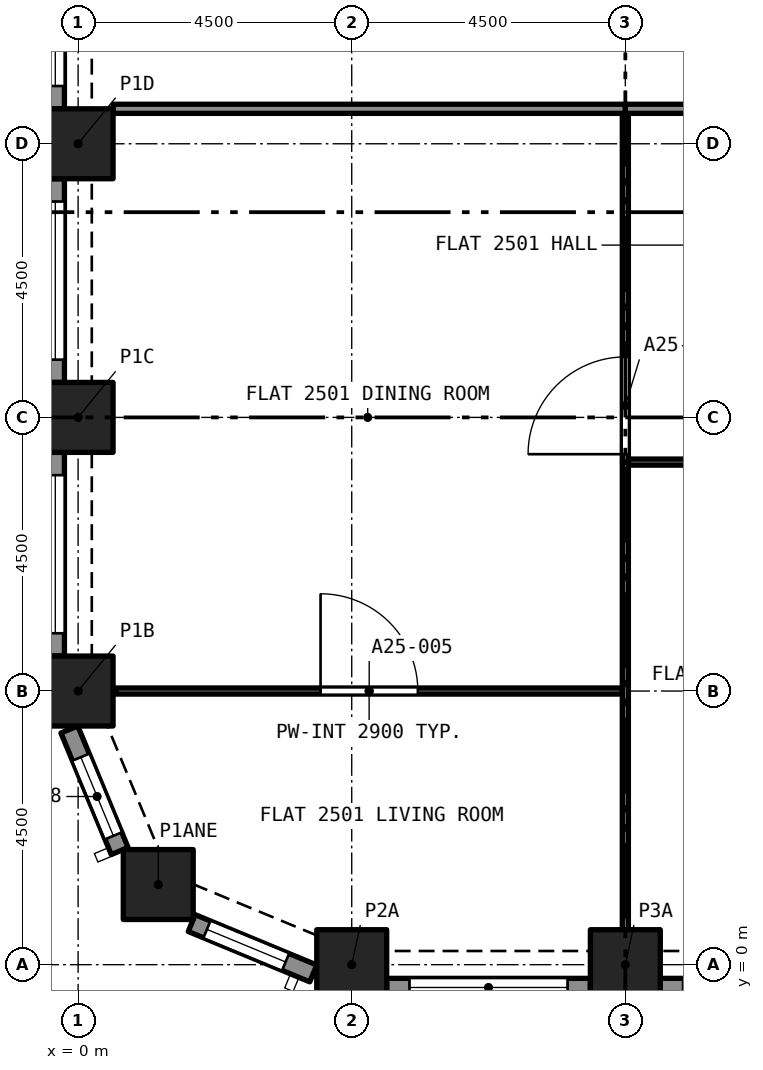
"""IFC4 building model, lengths in metres.
Left out: names, types, materials, properties, quantities, classifications, styles, units other than length and angle.
Written with IfcOpenShell. Run it as: python <this file> out.ifc"""

import sys

from ifc_helpers import new_model, si_unit, direction, frame, frame_2d, origin, origin_2d, place, context, subcontext, project, spatial, rectangle, extrude, element, fill, save


model = new_model("IFC4")
c1 = context("Model", 3, precision=1e-05, world=origin(), true_north=direction((0.0, 1.0)))
c2 = subcontext(c1, "Body", "Model", "MODEL_VIEW")
j1 = project(units=[si_unit("LENGTHUNIT", "METRE"), si_unit("PLANEANGLEUNIT", "RADIAN")], contexts=[c1])
p1 = place(None, origin())
s1 = spatial("IfcSite", under=j1, at=p1, CompositionType="ELEMENT")
p2 = place(p1, origin())
s2 = spatial("IfcBuilding", under=s1, at=p2, CompositionType="ELEMENT")
p3 = place(p2, frame((0.0, 0.0, 92.8)))
s3 = spatial("IfcBuildingStorey", under=s2, at=p3, CompositionType="ELEMENT", Elevation=92.8)
for number, where, z_axis, x_axis in (
    (1, (4.5, 0.0, 0.0), (0.0, 0.0, 1.0), (1.0, 0.0, 0.0)),
    (2, (9.0, 0.0, 0.0), (0.0, 0.0, 1.0), (1.0, 0.0, 0.0)),
    (3, (1.318, 1.318, 0.0), (0.0, 0.0, 1.0), (1.0, 0.0, 0.0)),
    (4, (0.0, 4.5, 0.0), (0.0, 0.0, 1.0), (1.0, 0.0, 0.0)),
    (5, (0.0, 9.0, 0.0), (0.0, 0.0, 1.0), (1.0, 0.0, 0.0)),
    (6, (0.0, 13.5, 0.0), (0.0, 0.0, 1.0), (1.0, 0.0, 0.0)),
):
    element("IfcColumn", number, at=place(p3, frame(where, z_axis=z_axis, x_axis=x_axis)), inside=s3, PredefinedType="COLUMN", context=c2, shape_type="SweptSolid", body=[
        extrude(rectangle(XDim=1.15, YDim=1.15, at=origin_2d()), origin(), (0.0, 0.0, 1.0), 3.2),
    ])
p4 = place(p3, frame((0.684, 1.869, 0.0), z_axis=(0.0, 0.0, 1.0), x_axis=(-0.382723818695, 0.923862802911, 0.0)))
e7 = element("IfcWall", 7, at=p4, inside=s3, PredefinedType="SOLIDWALL", context=c2, shape_type="SweptSolid", body=[
    extrude(rectangle(XDim=2.164, YDim=0.3, at=frame_2d((1.082, 0.0))), origin(), (0.0, 0.0, 1.0), 3.2),
])
p5 = place(p4, frame((0.271, 0.0, 0.45)))
e8 = element("IfcOpeningElement", 8, at=p5, cuts=e7, PredefinedType="OPENING", context=c2, shape_type="SweptSolid", body=[
    extrude(rectangle(XDim=1.4, YDim=1.95, at=frame_2d((0.7, 0.975))), frame((0.0, 0.16, 0.0), z_axis=(0.0, -1.0, 0.0), x_axis=(1.0, 0.0, 0.0)), (0.0, 0.0, 1.0), 0.32),
])
p6 = place(p3, frame((3.868, -0.144, 0.0), z_axis=(0.0, 0.0, 1.0), x_axis=(-0.923862802911, 0.382723818695, 0.0)))
e9 = element("IfcWall", 9, at=p6, inside=s3, PredefinedType="SOLIDWALL", context=c2, shape_type="SweptSolid", body=[
    extrude(rectangle(XDim=2.164, YDim=0.3, at=frame_2d((1.082, 0.0))), origin(), (0.0, 0.0, 1.0), 3.2),
])
p7 = place(p6, frame((0.493, 0.0, 0.45)))
e10 = element("IfcOpeningElement", 10, at=p7, cuts=e9, PredefinedType="OPENING", context=c2, shape_type="SweptSolid", body=[
    extrude(rectangle(XDim=1.4, YDim=1.95, at=frame_2d((0.7, 0.975))), frame((0.0, 0.16, 0.0), z_axis=(0.0, -1.0, 0.0), x_axis=(1.0, 0.0, 0.0)), (0.0, 0.0, 1.0), 0.32),
])
p8 = place(p3, frame((8.425, -0.375, 0.0), z_axis=(0.0, 0.0, 1.0), x_axis=(-1.0, 0.0, 0.0)))
e11 = element("IfcWall", 11, at=p8, inside=s3, PredefinedType="SOLIDWALL", context=c2, shape_type="SweptSolid", body=[
    extrude(rectangle(XDim=3.35, YDim=0.3, at=frame_2d((1.675, 0.0))), origin(), (0.0, 0.0, 1.0), 3.2),
])
p9 = place(p8, frame((0.375, 0.0, 0.45)))
e12 = element("IfcOpeningElement", 12, at=p9, cuts=e11, PredefinedType="OPENING", context=c2, shape_type="SweptSolid", body=[
    extrude(rectangle(XDim=2.6, YDim=1.95, at=frame_2d((1.3, 0.975))), frame((0.0, 0.16, 0.0), z_axis=(0.0, -1.0, 0.0), x_axis=(1.0, 0.0, 0.0)), (0.0, 0.0, 1.0), 0.32),
])
p10 = place(p3, frame((12.925, -0.375, 0.0), z_axis=(0.0, 0.0, 1.0), x_axis=(-1.0, 0.0, 0.0)))
e13 = element("IfcWall", 13, at=p10, inside=s3, PredefinedType="SOLIDWALL", context=c2, shape_type="SweptSolid", body=[
    extrude(rectangle(XDim=3.35, YDim=0.3, at=frame_2d((1.675, 0.0))), origin(), (0.0, 0.0, 1.0), 3.2),
])
p11 = place(p10, frame((0.375, 0.0, 0.45)))
e14 = element("IfcOpeningElement", 14, at=p11, cuts=e13, PredefinedType="OPENING", context=c2, shape_type="SweptSolid", body=[
    extrude(rectangle(XDim=2.6, YDim=1.95, at=frame_2d((1.3, 0.975))), frame((0.0, 0.16, 0.0), z_axis=(0.0, -1.0, 0.0), x_axis=(1.0, 0.0, 0.0)), (0.0, 0.0, 1.0), 0.32),
])
p12 = place(p3, frame((-0.375, 14.075, 0.0), z_axis=(0.0, 0.0, 1.0), x_axis=(0.0, 1.0, 0.0)))
e15 = element("IfcWall", 15, at=p12, inside=s3, PredefinedType="SOLIDWALL", context=c2, shape_type="SweptSolid", body=[
    extrude(rectangle(XDim=3.35, YDim=0.3, at=frame_2d((1.675, 0.0))), origin(), (0.0, 0.0, 1.0), 3.2),
])
p13 = place(p12, frame((0.375, 0.0, 0.45)))
e16 = element("IfcOpeningElement", 16, at=p13, cuts=e15, PredefinedType="OPENING", context=c2, shape_type="SweptSolid", body=[
    extrude(rectangle(XDim=2.6, YDim=1.95, at=frame_2d((1.3, 0.975))), frame((0.0, 0.16, 0.0), z_axis=(0.0, -1.0, 0.0), x_axis=(1.0, 0.0, 0.0)), (0.0, 0.0, 1.0), 0.32),
])
p14 = place(p3, frame((-0.375, 9.575, 0.0), z_axis=(0.0, 0.0, 1.0), x_axis=(0.0, 1.0, 0.0)))
e17 = element("IfcWall", 17, at=p14, inside=s3, PredefinedType="SOLIDWALL", context=c2, shape_type="SweptSolid", body=[
    extrude(rectangle(XDim=3.35, YDim=0.3, at=frame_2d((1.675, 0.0))), origin(), (0.0, 0.0, 1.0), 3.2),
])
p15 = place(p14, frame((0.375, 0.0, 0.45)))
e18 = element("IfcOpeningElement", 18, at=p15, cuts=e17, PredefinedType="OPENING", context=c2, shape_type="SweptSolid", body=[
    extrude(rectangle(XDim=2.6, YDim=1.95, at=frame_2d((1.3, 0.975))), frame((0.0, 0.16, 0.0), z_axis=(0.0, -1.0, 0.0), x_axis=(1.0, 0.0, 0.0)), (0.0, 0.0, 1.0), 0.32),
])
p16 = place(p3, frame((-0.375, 5.075, 0.0), z_axis=(0.0, 0.0, 1.0), x_axis=(0.0, 1.0, 0.0)))
e19 = element("IfcWall", 19, at=p16, inside=s3, PredefinedType="SOLIDWALL", context=c2, shape_type="SweptSolid", body=[
    extrude(rectangle(XDim=3.35, YDim=0.3, at=frame_2d((1.675, 0.0))), origin(), (0.0, 0.0, 1.0), 3.2),
])
p17 = place(p16, frame((0.375, 0.0, 0.45)))
e20 = element("IfcOpeningElement", 20, at=p17, cuts=e19, PredefinedType="OPENING", context=c2, shape_type="SweptSolid", body=[
    extrude(rectangle(XDim=2.6, YDim=1.95, at=frame_2d((1.3, 0.975))), frame((0.0, 0.16, 0.0), z_axis=(0.0, -1.0, 0.0), x_axis=(1.0, 0.0, 0.0)), (0.0, 0.0, 1.0), 0.32),
])
p18 = place(p3, frame((13.5, 8.265, 0.0), z_axis=(0.0, 0.0, 1.0), x_axis=(-1.0, 0.0, 0.0)))
e21 = element("IfcWall", 21, at=p18, inside=s3, PredefinedType="PARTITIONING", context=c2, shape_type="SweptSolid", body=[
    extrude(rectangle(XDim=4.45, YDim=0.1, at=frame_2d((2.225, 0.0))), origin(), (0.0, 0.0, 1.0), 2.9),
])
p19 = place(p18, frame((1.8, 0.0, 0.0)))
e22 = element("IfcOpeningElement", 22, at=p19, cuts=e21, PredefinedType="OPENING", context=c2, shape_type="SweptSolid", body=[
    extrude(rectangle(XDim=0.9, YDim=2.1, at=frame_2d((0.45, 1.05))), frame((0.0, 0.06, 0.0), z_axis=(0.0, -1.0, 0.0), x_axis=(1.0, 0.0, 0.0)), (0.0, 0.0, 1.0), 0.12),
])
p20 = place(p3, frame((9.0, 0.575, 0.0), z_axis=(0.0, 0.0, 1.0), x_axis=(0.0, 1.0, 0.0)))
e23 = element("IfcWall", 23, at=p20, inside=s3, PredefinedType="PARTITIONING", context=c2, shape_type="SweptSolid", body=[
    extrude(rectangle(XDim=7.69, YDim=0.1, at=frame_2d((3.845, 0.0))), origin(), (0.0, 0.0, 1.0), 2.9),
])
p21 = place(p3, frame((9.0, 8.265, 0.0), z_axis=(0.0, 0.0, 1.0), x_axis=(0.0, 1.0, 0.0)))
e24 = element("IfcWall", 24, at=p21, inside=s3, PredefinedType="PARTITIONING", context=c2, shape_type="SweptSolid", body=[
    extrude(rectangle(XDim=5.735, YDim=0.1, at=frame_2d((2.868, 0.0))), origin(), (0.0, 0.0, 1.0), 2.9),
])
p22 = place(p21, frame((0.13, 0.0, 0.0)))
e25 = element("IfcOpeningElement", 25, at=p22, cuts=e24, PredefinedType="OPENING", context=c2, shape_type="SweptSolid", body=[
    extrude(rectangle(XDim=1.6, YDim=2.1, at=frame_2d((0.8, 1.05))), frame((0.0, 0.06, 0.0), z_axis=(0.0, -1.0, 0.0), x_axis=(1.0, 0.0, 0.0)), (0.0, 0.0, 1.0), 0.12),
])
p23 = place(p3, frame((0.622, 4.5, 0.0), z_axis=(0.0, 0.0, 1.0), x_axis=(1.0, 0.0, 0.0)))
e26 = element("IfcWall", 26, at=p23, inside=s3, PredefinedType="PARTITIONING", context=c2, shape_type="SweptSolid", body=[
    extrude(rectangle(XDim=8.328, YDim=0.1, at=frame_2d((4.164, 0.0))), origin(), (0.0, 0.0, 1.0), 2.9),
])
p24 = place(p23, frame((3.365, 0.0, 0.0)))
e27 = element("IfcOpeningElement", 27, at=p24, cuts=e26, PredefinedType="OPENING", context=c2, shape_type="SweptSolid", body=[
    extrude(rectangle(XDim=1.6, YDim=2.1, at=frame_2d((0.8, 1.05))), frame((0.0, 0.06, 0.0), z_axis=(0.0, -1.0, 0.0), x_axis=(1.0, 0.0, 0.0)), (0.0, 0.0, 1.0), 0.12),
])
p25 = place(p3, frame((0.575, 14.075, 0.0), z_axis=(0.0, 0.0, 1.0), x_axis=(1.0, 0.0, 0.0)))
e28 = element("IfcWall", 28, at=p25, inside=s3, PredefinedType="PARTITIONING", context=c2, shape_type="SweptSolid", body=[
    extrude(rectangle(XDim=8.425, YDim=0.15, at=frame_2d((4.212, 0.0))), origin(), (0.0, 0.0, 1.0), 2.9),
])
p26 = place(p3, frame((11.925, 14.075, 0.0), z_axis=(0.0, 0.0, 1.0), x_axis=(-1.0, 0.0, 0.0)))
e29 = element("IfcWall", 29, at=p26, inside=s3, PredefinedType="PARTITIONING", context=c2, shape_type="SweptSolid", body=[
    extrude(rectangle(XDim=2.925, YDim=0.15, at=frame_2d((1.462, 0.0))), origin(), (0.0, 0.0, 1.0), 2.9),
])
p27 = place(p26, frame((0.175, 0.0, 0.0)))
e30 = element("IfcOpeningElement", 30, at=p27, cuts=e29, PredefinedType="OPENING", context=c2, shape_type="SweptSolid", body=[
    extrude(rectangle(XDim=1.0, YDim=2.1, at=frame_2d((0.5, 1.05))), frame((0.0, 0.085, 0.0), z_axis=(0.0, -1.0, 0.0), x_axis=(1.0, 0.0, 0.0)), (0.0, 0.0, 1.0), 0.17),
])
p28 = place(p5, origin())
e31 = element("IfcWindow", 31, at=p28, inside=s3, PartitioningType="SINGLE_PANEL", PredefinedType="WINDOW", context=c2, shape_type="SweptSolid", body=[
    extrude(rectangle(XDim=1.4, YDim=1.95, at=frame_2d((0.7, 0.975))), frame((0.0, 0.03, 0.0), z_axis=(0.0, -1.0, 0.0), x_axis=(1.0, 0.0, 0.0)), (0.0, 0.0, 1.0), 0.06),
])
fill(e8, e31)
p29 = place(p7, origin())
e32 = element("IfcWindow", 32, at=p29, inside=s3, PartitioningType="SINGLE_PANEL", PredefinedType="WINDOW", context=c2, shape_type="SweptSolid", body=[
    extrude(rectangle(XDim=1.4, YDim=1.95, at=frame_2d((0.7, 0.975))), frame((0.0, 0.03, 0.0), z_axis=(0.0, -1.0, 0.0), x_axis=(1.0, 0.0, 0.0)), (0.0, 0.0, 1.0), 0.06),
])
fill(e10, e32)
p30 = place(p9, origin())
e33 = element("IfcWindow", 33, at=p30, inside=s3, PartitioningType="SINGLE_PANEL", PredefinedType="WINDOW", context=c2, shape_type="SweptSolid", body=[
    extrude(rectangle(XDim=2.6, YDim=1.95, at=frame_2d((1.3, 0.975))), frame((0.0, 0.03, 0.0), z_axis=(0.0, -1.0, 0.0), x_axis=(1.0, 0.0, 0.0)), (0.0, 0.0, 1.0), 0.06),
])
fill(e12, e33)
p31 = place(p13, origin())
e34 = element("IfcWindow", 34, at=p31, inside=s3, PartitioningType="SINGLE_PANEL", PredefinedType="WINDOW", context=c2, shape_type="SweptSolid", body=[
    extrude(rectangle(XDim=2.6, YDim=1.95, at=frame_2d((1.3, 0.975))), frame((0.0, 0.03, 0.0), z_axis=(0.0, -1.0, 0.0), x_axis=(1.0, 0.0, 0.0)), (0.0, 0.0, 1.0), 0.06),
])
fill(e16, e34)
p32 = place(p15, origin())
e35 = element("IfcWindow", 35, at=p32, inside=s3, PartitioningType="SINGLE_PANEL", PredefinedType="WINDOW", context=c2, shape_type="SweptSolid", body=[
    extrude(rectangle(XDim=2.6, YDim=1.95, at=frame_2d((1.3, 0.975))), frame((0.0, 0.03, 0.0), z_axis=(0.0, -1.0, 0.0), x_axis=(1.0, 0.0, 0.0)), (0.0, 0.0, 1.0), 0.06),
])
fill(e18, e35)
p33 = place(p17, origin())
e36 = element("IfcWindow", 36, at=p33, inside=s3, PartitioningType="SINGLE_PANEL", PredefinedType="WINDOW", context=c2, shape_type="SweptSolid", body=[
    extrude(rectangle(XDim=2.6, YDim=1.95, at=frame_2d((1.3, 0.975))), frame((0.0, 0.03, 0.0), z_axis=(0.0, -1.0, 0.0), x_axis=(1.0, 0.0, 0.0)), (0.0, 0.0, 1.0), 0.06),
])
fill(e20, e36)
p34 = place(p22, origin())
e37 = element("IfcDoor", 37, at=p34, inside=s3, OperationType="SINGLE_SWING_LEFT", PredefinedType="DOOR", context=c2, shape_type="SweptSolid", body=[
    extrude(rectangle(XDim=1.6, YDim=2.1, at=frame_2d((0.8, 1.05))), frame((0.0, 0.025, 0.0), z_axis=(0.0, -1.0, 0.0), x_axis=(1.0, 0.0, 0.0)), (0.0, 0.0, 1.0), 0.05),
])
fill(e25, e37)
p35 = place(p24, origin())
e38 = element("IfcDoor", 38, at=p35, inside=s3, OperationType="SINGLE_SWING_RIGHT", PredefinedType="DOOR", context=c2, shape_type="SweptSolid", body=[
    extrude(rectangle(XDim=1.6, YDim=2.1, at=frame_2d((0.8, 1.05))), frame((0.0, 0.025, 0.0), z_axis=(0.0, -1.0, 0.0), x_axis=(1.0, 0.0, 0.0)), (0.0, 0.0, 1.0), 0.05),
])
fill(e27, e38)
save(model, sys.argv[1])
